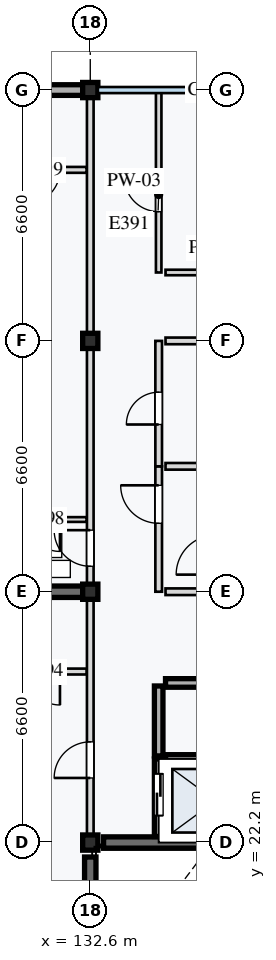
"""IFC4 building model, lengths in metres.
Left out: names, types, materials, properties, quantities, classifications, styles, units other than length and angle.
Written with IfcOpenShell. Run it as: python <this file> out.ifc"""

import sys

from ifc_helpers import new_model, si_unit, direction, frame, frame_2d, origin, origin_2d, place, context, subcontext, project, spatial, rectangle, extrude, element, fill, save


model = new_model("IFC4")
c1 = context("Model", 3, precision=1e-05, world=origin(), true_north=direction((0.0, 1.0)))
c2 = subcontext(c1, "Body", "Model", "MODEL_VIEW")
j1 = project(units=[si_unit("LENGTHUNIT", "METRE"), si_unit("PLANEANGLEUNIT", "RADIAN")], contexts=[c1])
p1 = place(None, origin())
s1 = spatial("IfcSite", under=j1, at=p1, CompositionType="ELEMENT")
p2 = place(p1, origin())
s2 = spatial("IfcBuilding", under=s1, at=p2, CompositionType="ELEMENT")
p3 = place(p2, frame((0.0, 0.0, 34.0)))
s3 = spatial("IfcBuildingStorey", under=s2, at=p3, CompositionType="ELEMENT", Elevation=34.0)
for number, where, z_axis, x_axis in (
    (1, (132.6, 22.2, 0.0), (0.0, 0.0, 1.0), (1.0, 0.0, 0.0)),
    (2, (132.6, 28.8, 0.0), (0.0, 0.0, 1.0), (1.0, 0.0, 0.0)),
    (3, (132.6, 35.4, 0.0), (0.0, 0.0, 1.0), (1.0, 0.0, 0.0)),
    (4, (132.6, 42.0, 0.0), (0.0, 0.0, 1.0), (1.0, 0.0, 0.0)),
):
    element("IfcColumn", number, at=place(p3, frame(where, z_axis=z_axis, x_axis=x_axis)), inside=s3, PredefinedType="COLUMN", context=c2, shape_type="SweptSolid", body=[
        extrude(rectangle(XDim=0.4, YDim=0.4, at=origin_2d()), origin(), (0.0, 0.0, 1.0), 3.2),
    ])
p4 = place(p3, frame((132.6, 15.98, 0.0), z_axis=(0.0, 0.0, 1.0), x_axis=(0.0, 1.0, 0.0)))
e5 = element("IfcWall", 5, at=p4, inside=s3, PredefinedType="SHEAR", context=c2, shape_type="SweptSolid", body=[
    extrude(rectangle(XDim=5.84, YDim=0.3, at=frame_2d((2.92, 0.0))), origin(), (0.0, 0.0, 1.0), 2.97),
])
p5 = place(p3, frame((132.95, 22.2, 0.0), z_axis=(0.0, 0.0, 1.0), x_axis=(1.0, 0.0, 0.0)))
e6 = element("IfcWall", 6, at=p5, inside=s3, PredefinedType="SHEAR", context=c2, shape_type="SweptSolid", body=[
    extrude(rectangle(XDim=2.8, YDim=0.3, at=frame_2d((1.4, 0.0))), origin(), (0.0, 0.0, 1.0), 2.97),
])
p6 = place(p3, frame((126.2, 28.8, 0.0), z_axis=(0.0, 0.0, 1.0), x_axis=(1.0, 0.0, 0.0)))
e7 = element("IfcWall", 7, at=p6, inside=s3, PredefinedType="SHEAR", context=c2, shape_type="SweptSolid", body=[
    extrude(rectangle(XDim=6.2, YDim=0.3, at=frame_2d((3.1, 0.0))), origin(), (0.0, 0.0, 1.0), 2.97),
])
p7 = place(p3, frame((126.2, 42.0, 0.0), z_axis=(0.0, 0.0, 1.0), x_axis=(1.0, 0.0, 0.0)))
e8 = element("IfcWall", 8, at=p7, inside=s3, PredefinedType="STANDARD", context=c2, shape_type="SweptSolid", body=[
    extrude(rectangle(XDim=6.2, YDim=0.28, at=frame_2d((3.1, 0.0))), origin(), (0.0, 0.0, 1.0), 2.65),
])
p8 = place(p3, frame((134.4, 22.36, 0.0), z_axis=(0.0, 0.0, 1.0), x_axis=(0.0, 1.0, 0.0)))
e9 = element("IfcWall", 9, at=p8, inside=s3, PredefinedType="STANDARD", context=c2, shape_type="SweptSolid", body=[
    extrude(rectangle(XDim=2.04, YDim=0.225, at=frame_2d((1.02, 0.0))), origin(), (0.0, 0.0, 1.0), 2.935),
])
p9 = place(p8, frame((0.55, 0.0, 0.0)))
e10 = element("IfcOpeningElement", 10, at=p9, cuts=e9, PredefinedType="OPENING", context=c2, shape_type="SweptSolid", body=[
    extrude(rectangle(XDim=1.1, YDim=2.1, at=frame_2d((0.55, 1.05))), frame((0.0, 0.123, 0.0), z_axis=(0.0, -1.0, 0.0), x_axis=(1.0, 0.0, 0.0)), (0.0, 0.0, 1.0), 0.245),
])
p10 = place(p3, frame((134.4, 24.48, 0.0), z_axis=(0.0, 0.0, 1.0), x_axis=(0.0, 1.0, 0.0)))
e11 = element("IfcWall", 11, at=p10, inside=s3, PredefinedType="STANDARD", context=c2, shape_type="SweptSolid", body=[
    extrude(rectangle(XDim=1.84, YDim=0.225, at=frame_2d((0.92, 0.0))), origin(), (0.0, 0.0, 1.0), 2.935),
])
for number, where, z_axis, x_axis in (
    (12, (134.58, 24.4, 0.0), (0.0, 0.0, 1.0), (1.0, 0.0, 0.0)),
    (13, (134.58, 26.4, 0.0), (0.0, 0.0, 1.0), (1.0, 0.0, 0.0)),
):
    element("IfcWall", number, at=place(p3, frame(where, z_axis=z_axis, x_axis=x_axis)), inside=s3, PredefinedType="STANDARD", context=c2, shape_type="SweptSolid", body=[
        extrude(rectangle(XDim=2.64, YDim=0.225, at=frame_2d((1.32, 0.0))), origin(), (0.0, 0.0, 1.0), 2.935),
    ])
p11 = place(p3, frame((134.4, 28.8, 0.0), z_axis=(0.0, 0.0, 1.0), x_axis=(0.0, 1.0, 0.0)))
e14 = element("IfcWall", 14, at=p11, inside=s3, PredefinedType="PARTITIONING", context=c2, shape_type="SweptSolid", body=[
    extrude(rectangle(XDim=3.3, YDim=0.175, at=frame_2d((1.65, 0.0))), origin(), (0.0, 0.0, 1.0), 2.935),
])
p12 = place(p11, frame((1.8, 0.0, 0.0)))
e15 = element("IfcOpeningElement", 15, at=p12, cuts=e14, PredefinedType="OPENING", context=c2, shape_type="SweptSolid", body=[
    extrude(rectangle(XDim=1.0, YDim=2.1, at=frame_2d((0.5, 1.05))), frame((0.0, 0.097, 0.0), z_axis=(0.0, -1.0, 0.0), x_axis=(1.0, 0.0, 0.0)), (0.0, 0.0, 1.0), 0.195),
])
p13 = place(p3, frame((134.4, 32.1, 0.0), z_axis=(0.0, 0.0, 1.0), x_axis=(0.0, 1.0, 0.0)))
e16 = element("IfcWall", 16, at=p13, inside=s3, PredefinedType="PARTITIONING", context=c2, shape_type="SweptSolid", body=[
    extrude(rectangle(XDim=3.3, YDim=0.175, at=frame_2d((1.65, 0.0))), origin(), (0.0, 0.0, 1.0), 2.935),
])
p14 = place(p13, frame((1.1, 0.0, 0.0)))
e17 = element("IfcOpeningElement", 17, at=p14, cuts=e16, PredefinedType="OPENING", context=c2, shape_type="SweptSolid", body=[
    extrude(rectangle(XDim=0.85, YDim=2.0, at=frame_2d((0.425, 1.0))), frame((0.0, 0.097, 0.0), z_axis=(0.0, -1.0, 0.0), x_axis=(1.0, 0.0, 0.0)), (0.0, 0.0, 1.0), 0.195),
])
for number, where, z_axis, x_axis in (
    (18, (134.58, 28.8, 0.0), (0.0, 0.0, 1.0), (1.0, 0.0, 0.0)),
    (19, (134.58, 32.1, 0.0), (0.0, 0.0, 1.0), (1.0, 0.0, 0.0)),
    (20, (134.58, 35.4, 0.0), (0.0, 0.0, 1.0), (1.0, 0.0, 0.0)),
):
    element("IfcWall", number, at=place(p3, frame(where, z_axis=z_axis, x_axis=x_axis)), inside=s3, PredefinedType="PARTITIONING", context=c2, shape_type="SweptSolid", body=[
        extrude(rectangle(XDim=1.14, YDim=0.175, at=frame_2d((0.57, 0.0))), origin(), (0.0, 0.0, 1.0), 2.935),
    ])
p15 = place(p3, frame((134.4, 37.2, 0.0), z_axis=(0.0, 0.0, 1.0), x_axis=(0.0, 1.0, 0.0)))
e21 = element("IfcWall", 21, at=p15, inside=s3, PredefinedType="PARTITIONING", context=c2, shape_type="SweptSolid", body=[
    extrude(rectangle(XDim=4.8, YDim=0.145, at=frame_2d((2.4, 0.0))), origin(), (0.0, 0.0, 1.0), 2.935),
])
p16 = place(p15, frame((1.6, 0.0, 0.0)))
e22 = element("IfcOpeningElement", 22, at=p16, cuts=e21, PredefinedType="OPENING", context=c2, shape_type="SweptSolid", body=[
    extrude(rectangle(XDim=0.9, YDim=2.16, at=frame_2d((0.45, 1.08))), frame((0.0, 0.083, 0.0), z_axis=(0.0, -1.0, 0.0), x_axis=(1.0, 0.0, 0.0)), (0.0, 0.0, 1.0), 0.165),
])
p17 = place(p3, frame((134.58, 37.2, 0.0), z_axis=(0.0, 0.0, 1.0), x_axis=(1.0, 0.0, 0.0)))
e23 = element("IfcWall", 23, at=p17, inside=s3, PredefinedType="PARTITIONING", context=c2, shape_type="SweptSolid", body=[
    extrude(rectangle(XDim=2.64, YDim=0.145, at=frame_2d((1.32, 0.0))), origin(), (0.0, 0.0, 1.0), 2.935),
])
p18 = place(p3, frame((132.6, 22.2, 0.0), z_axis=(0.0, 0.0, 1.0), x_axis=(0.0, 1.0, 0.0)))
e24 = element("IfcWall", 24, at=p18, inside=s3, PredefinedType="PARTITIONING", context=c2, shape_type="SweptSolid", body=[
    extrude(rectangle(XDim=6.6, YDim=0.175, at=frame_2d((3.3, 0.0))), origin(), (0.0, 0.0, 1.0), 2.7),
])
p19 = place(p18, frame((1.7, 0.0, 0.0)))
e25 = element("IfcOpeningElement", 25, at=p19, cuts=e24, PredefinedType="OPENING", context=c2, shape_type="SweptSolid", body=[
    extrude(rectangle(XDim=0.95, YDim=2.1, at=frame_2d((0.475, 1.05))), frame((0.0, 0.097, 0.0), z_axis=(0.0, -1.0, 0.0), x_axis=(1.0, 0.0, 0.0)), (0.0, 0.0, 1.0), 0.195),
])
p20 = place(p3, frame((132.502, 26.7, 0.0), z_axis=(0.0, 0.0, 1.0), x_axis=(-1.0, 0.0, 0.0)))
e26 = element("IfcWall", 26, at=p20, inside=s3, PredefinedType="PARTITIONING", context=c2, shape_type="SweptSolid", body=[
    extrude(rectangle(XDim=2.302, YDim=0.155, at=frame_2d((1.151, 0.0))), origin(), (0.0, 0.0, 1.0), 2.935),
])
p21 = place(p20, frame((0.7, 0.0, 0.0)))
e27 = element("IfcOpeningElement", 27, at=p21, cuts=e26, PredefinedType="OPENING", context=c2, shape_type="SweptSolid", body=[
    extrude(rectangle(XDim=0.88, YDim=2.16, at=frame_2d((0.44, 1.08))), frame((0.0, 0.087, 0.0), z_axis=(0.0, -1.0, 0.0), x_axis=(1.0, 0.0, 0.0)), (0.0, 0.0, 1.0), 0.175),
])
p22 = place(p3, frame((132.6, 28.8, 0.0), z_axis=(0.0, 0.0, 1.0), x_axis=(0.0, 1.0, 0.0)))
e28 = element("IfcWall", 28, at=p22, inside=s3, PredefinedType="PARTITIONING", context=c2, shape_type="SweptSolid", body=[
    extrude(rectangle(XDim=13.2, YDim=0.175, at=frame_2d((6.6, 0.0))), origin(), (0.0, 0.0, 1.0), 2.7),
])
p23 = place(p22, frame((0.67, 0.0, 0.0)))
e29 = element("IfcOpeningElement", 29, at=p23, cuts=e28, PredefinedType="OPENING", context=c2, shape_type="SweptSolid", body=[
    extrude(rectangle(XDim=0.95, YDim=2.16, at=frame_2d((0.475, 1.08))), frame((0.0, 0.097, 0.0), z_axis=(0.0, -1.0, 0.0), x_axis=(1.0, 0.0, 0.0)), (0.0, 0.0, 1.0), 0.195),
])
p24 = place(p3, frame((132.502, 30.7, 0.0), z_axis=(0.0, 0.0, 1.0), x_axis=(-1.0, 0.0, 0.0)))
e30 = element("IfcWall", 30, at=p24, inside=s3, PredefinedType="PARTITIONING", context=c2, shape_type="SweptSolid", body=[
    extrude(rectangle(XDim=2.302, YDim=0.125, at=frame_2d((1.151, 0.0))), origin(), (0.0, 0.0, 1.0), 2.935),
])
p25 = place(p24, frame((0.7, 0.0, 0.0)))
e31 = element("IfcOpeningElement", 31, at=p25, cuts=e30, PredefinedType="OPENING", context=c2, shape_type="SweptSolid", body=[
    extrude(rectangle(XDim=0.84, YDim=2.06, at=frame_2d((0.42, 1.03))), frame((0.0, 0.073, 0.0), z_axis=(0.0, -1.0, 0.0), x_axis=(1.0, 0.0, 0.0)), (0.0, 0.0, 1.0), 0.145),
])
p26 = place(p3, frame((132.502, 39.9, 0.0), z_axis=(0.0, 0.0, 1.0), x_axis=(-1.0, 0.0, 0.0)))
e32 = element("IfcWall", 32, at=p26, inside=s3, PredefinedType="PARTITIONING", context=c2, shape_type="SweptSolid", body=[
    extrude(rectangle(XDim=2.302, YDim=0.155, at=frame_2d((1.151, 0.0))), origin(), (0.0, 0.0, 1.0), 2.935),
])
p27 = place(p26, frame((0.7, 0.0, 0.0)))
e33 = element("IfcOpeningElement", 33, at=p27, cuts=e32, PredefinedType="OPENING", context=c2, shape_type="SweptSolid", body=[
    extrude(rectangle(XDim=0.9, YDim=2.1, at=frame_2d((0.45, 1.05))), frame((0.0, 0.087, 0.0), z_axis=(0.0, -1.0, 0.0), x_axis=(1.0, 0.0, 0.0)), (0.0, 0.0, 1.0), 0.175),
])
p28 = place(p9, origin())
e34 = element("IfcDoor", 34, at=p28, inside=s3, OperationType="DOUBLE_DOOR_SLIDING", PredefinedType="DOOR", context=c2, shape_type="SweptSolid", body=[
    extrude(rectangle(XDim=1.1, YDim=2.1, at=frame_2d((0.55, 1.05))), frame((0.0, 0.025, 0.0), z_axis=(0.0, -1.0, 0.0), x_axis=(1.0, 0.0, 0.0)), (0.0, 0.0, 1.0), 0.05),
])
fill(e10, e34)
p29 = place(p12, origin())
e35 = element("IfcDoor", 35, at=p29, inside=s3, OperationType="SINGLE_SWING_RIGHT", PredefinedType="DOOR", context=c2, shape_type="SweptSolid", body=[
    extrude(rectangle(XDim=1.0, YDim=2.1, at=frame_2d((0.5, 1.05))), frame((0.0, 0.025, 0.0), z_axis=(0.0, -1.0, 0.0), x_axis=(1.0, 0.0, 0.0)), (0.0, 0.0, 1.0), 0.05),
])
fill(e15, e35)
p30 = place(p14, origin())
e36 = element("IfcDoor", 36, at=p30, inside=s3, OperationType="SINGLE_SWING_LEFT", PredefinedType="DOOR", context=c2, shape_type="SweptSolid", body=[
    extrude(rectangle(XDim=0.85, YDim=2.0, at=frame_2d((0.425, 1.0))), frame((0.0, 0.025, 0.0), z_axis=(0.0, -1.0, 0.0), x_axis=(1.0, 0.0, 0.0)), (0.0, 0.0, 1.0), 0.05),
])
fill(e17, e36)
p31 = place(p16, origin())
e37 = element("IfcDoor", 37, at=p31, inside=s3, OperationType="SINGLE_SWING_RIGHT", PredefinedType="DOOR", context=c2, shape_type="SweptSolid", body=[
    extrude(rectangle(XDim=0.9, YDim=2.16, at=frame_2d((0.45, 1.08))), frame((0.0, 0.025, 0.0), z_axis=(0.0, -1.0, 0.0), x_axis=(1.0, 0.0, 0.0)), (0.0, 0.0, 1.0), 0.05),
])
fill(e22, e37)
p32 = place(p19, origin())
e38 = element("IfcDoor", 38, at=p32, inside=s3, OperationType="SINGLE_SWING_LEFT", PredefinedType="DOOR", context=c2, shape_type="SweptSolid", body=[
    extrude(rectangle(XDim=0.95, YDim=2.1, at=frame_2d((0.475, 1.05))), frame((0.0, 0.025, 0.0), z_axis=(0.0, -1.0, 0.0), x_axis=(1.0, 0.0, 0.0)), (0.0, 0.0, 1.0), 0.05),
])
fill(e25, e38)
p33 = place(p21, origin())
e39 = element("IfcDoor", 39, at=p33, inside=s3, OperationType="SINGLE_SWING_LEFT", PredefinedType="DOOR", context=c2, shape_type="SweptSolid", body=[
    extrude(rectangle(XDim=0.88, YDim=2.16, at=frame_2d((0.44, 1.08))), frame((0.0, 0.025, 0.0), z_axis=(0.0, -1.0, 0.0), x_axis=(1.0, 0.0, 0.0)), (0.0, 0.0, 1.0), 0.05),
])
fill(e27, e39)
p34 = place(p23, origin())
e40 = element("IfcDoor", 40, at=p34, inside=s3, OperationType="SINGLE_SWING_RIGHT", PredefinedType="DOOR", context=c2, shape_type="SweptSolid", body=[
    extrude(rectangle(XDim=0.95, YDim=2.16, at=frame_2d((0.475, 1.08))), frame((0.0, 0.025, 0.0), z_axis=(0.0, -1.0, 0.0), x_axis=(1.0, 0.0, 0.0)), (0.0, 0.0, 1.0), 0.05),
])
fill(e29, e40)
p35 = place(p25, origin())
e41 = element("IfcDoor", 41, at=p35, inside=s3, OperationType="SINGLE_SWING_LEFT", PredefinedType="DOOR", context=c2, shape_type="SweptSolid", body=[
    extrude(rectangle(XDim=0.84, YDim=2.06, at=frame_2d((0.42, 1.03))), frame((0.0, 0.025, 0.0), z_axis=(0.0, -1.0, 0.0), x_axis=(1.0, 0.0, 0.0)), (0.0, 0.0, 1.0), 0.05),
])
fill(e31, e41)
p36 = place(p27, origin())
e42 = element("IfcDoor", 42, at=p36, inside=s3, OperationType="SINGLE_SWING_RIGHT", PredefinedType="DOOR", context=c2, shape_type="SweptSolid", body=[
    extrude(rectangle(XDim=0.9, YDim=2.1, at=frame_2d((0.45, 1.05))), frame((0.0, 0.025, 0.0), z_axis=(0.0, -1.0, 0.0), x_axis=(1.0, 0.0, 0.0)), (0.0, 0.0, 1.0), 0.05),
])
fill(e33, e42)
save(model, sys.argv[1])
